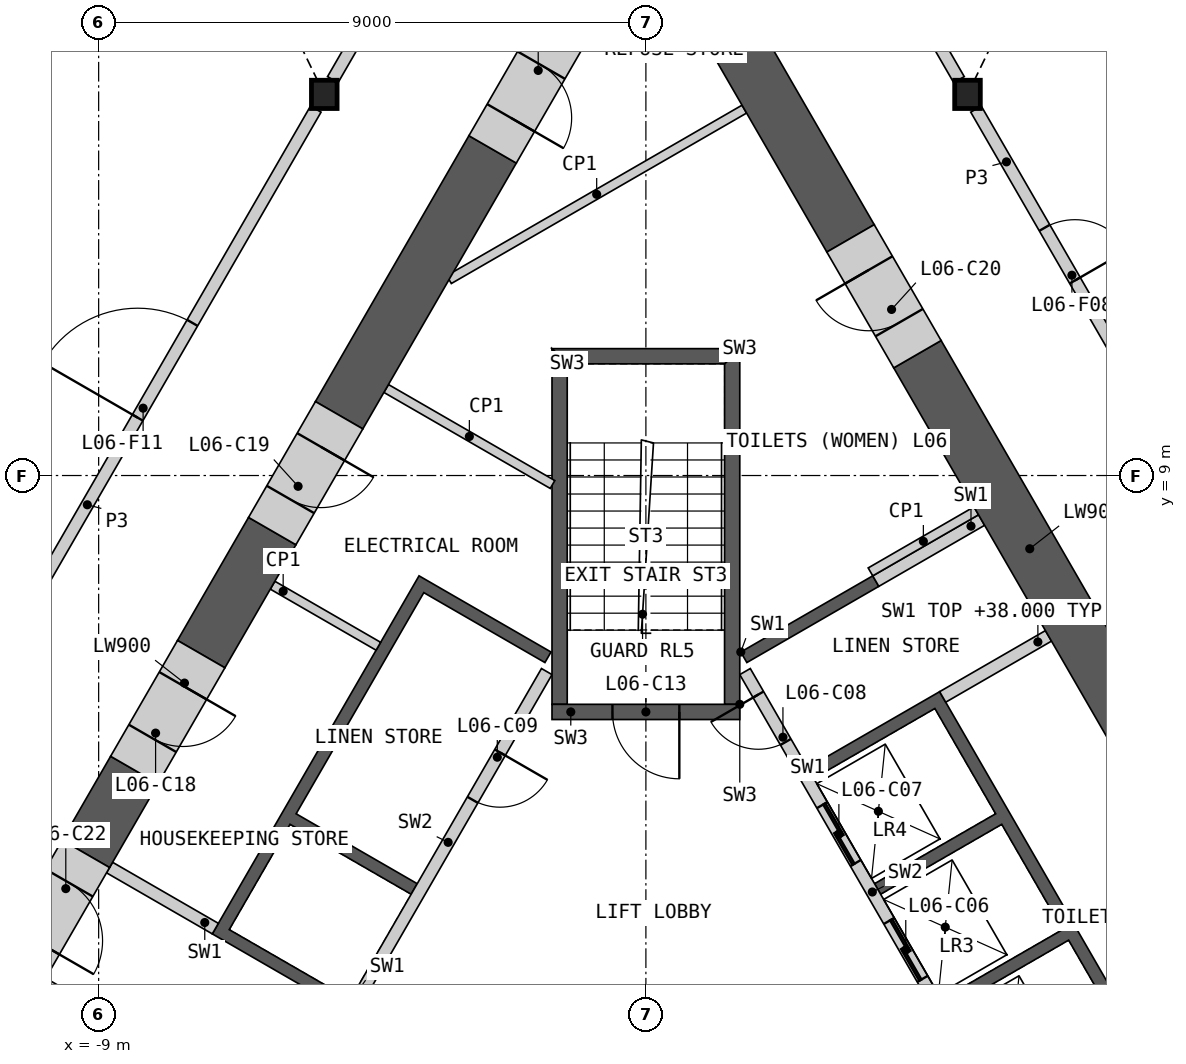
"""IFC4 building model, lengths in metres.
Left out: names, types, materials, properties, quantities, classifications, styles, units other than length and angle.
Written with IfcOpenShell. Run it as: python <this file> out.ifc"""

import sys

from ifc_helpers import new_model, si_unit, direction, frame, frame_2d, origin, origin_2d, place, context, subcontext, project, spatial, polyline, rectangle, i_section, outline, extrude, element, fill, save


model = new_model("IFC4")
c1 = context("Model", 3, precision=1e-05, world=origin(), true_north=direction((0.0, 1.0)))
c2 = subcontext(c1, "Body", "Model", "MODEL_VIEW")
j1 = project(units=[si_unit("LENGTHUNIT", "METRE"), si_unit("PLANEANGLEUNIT", "RADIAN")], contexts=[c1])
p1 = place(None, origin())
s1 = spatial("IfcSite", under=j1, at=p1, CompositionType="ELEMENT")
p2 = place(p1, origin())
s2 = spatial("IfcBuilding", under=s1, at=p2, CompositionType="ELEMENT")
p3 = place(p2, frame((0.0, 0.0, 34.2)))
s3 = spatial("IfcBuildingStorey", under=s2, at=p3, CompositionType="ELEMENT", Elevation=34.2)
for number, where, z_axis, x_axis in (
    (1, (-5.289, 15.269, 0.0), (0.0, 0.0, 1.0), (1.0, 0.0, 0.0)),
    (2, (5.289, 15.269, 0.0), (0.0, 0.0, 1.0), (1.0, 0.0, 0.0)),
):
    element("IfcColumn", number, at=place(p3, frame(where, z_axis=z_axis, x_axis=x_axis)), inside=s3, PredefinedType="COLUMN", context=c2, shape_type="SweptSolid", body=[
        extrude(i_section(OverallWidth=0.421, OverallDepth=0.465, WebThickness=0.045, FlangeThickness=0.072, at=origin_2d()), origin(), (0.0, 0.0, 1.0), 4.2),
    ])
p4 = place(p3, origin())
e3 = element("IfcWall", 3, at=p4, inside=s3, PredefinedType="SHEAR", context=c2, shape_type="SweptSolid", body=[
    extrude(outline(polyline([(1.561, 6.097), (3.731, 7.35), (3.831, 7.177), (1.66, 5.924), (1.561, 6.097)])), origin(), (0.0, 0.0, 1.0), 3.8),
])
p5 = place(p3, origin())
e4 = element("IfcWall", 4, at=p5, inside=s3, PredefinedType="SHEAR", context=c2, shape_type="SweptSolid", body=[
    extrude(outline(polyline([(2.66, 4.192), (4.831, 5.445), (8.231, -0.444), (6.061, -1.697), (5.96, -1.524), (7.952, -0.374), (6.952, 1.358), (4.96, 0.208), (4.861, 0.381), (6.852, 1.531), (5.852, 3.263), (3.861, 2.113), (3.76, 2.287), (5.752, 3.437), (4.752, 5.169), (2.76, 4.019), (2.66, 4.192)])), origin(), (0.0, 0.0, 1.0), 3.8),
])
p6 = place(p3, frame((5.817, -1.476, 0.0), z_axis=(0.0, 0.0, 1.0), x_axis=(-0.500002616675, 0.866023893041, 0.0)))
e5 = element("IfcWall", 5, at=p6, inside=s3, PredefinedType="SOLIDWALL", context=c2, shape_type="SweptSolid", body=[
    extrude(rectangle(XDim=8.373, YDim=0.2, at=frame_2d((4.187, 0.0))), origin(), (0.0, 0.0, 1.0), 3.8),
])
p7 = place(p6, frame((0.337, 0.0, 0.0)))
e6 = element("IfcOpeningElement", 6, at=p7, cuts=e5, PredefinedType="OPENING", context=c2, shape_type="SweptSolid", body=[
    extrude(rectangle(XDim=1.1, YDim=2.1, at=frame_2d((0.55, 1.05))), frame((0.0, 0.11, 0.0), z_axis=(0.0, -1.0, 0.0), x_axis=(1.0, 0.0, 0.0)), (0.0, 0.0, 1.0), 0.22),
])
p8 = place(p6, frame((2.537, 0.0, 0.0)))
e7 = element("IfcOpeningElement", 7, at=p8, cuts=e5, PredefinedType="OPENING", context=c2, shape_type="SweptSolid", body=[
    extrude(rectangle(XDim=1.1, YDim=2.1, at=frame_2d((0.55, 1.05))), frame((0.0, 0.11, 0.0), z_axis=(0.0, -1.0, 0.0), x_axis=(1.0, 0.0, 0.0)), (0.0, 0.0, 1.0), 0.22),
])
p9 = place(p6, frame((4.737, 0.0, 0.0)))
e8 = element("IfcOpeningElement", 8, at=p9, cuts=e5, PredefinedType="OPENING", context=c2, shape_type="SweptSolid", body=[
    extrude(rectangle(XDim=1.1, YDim=2.1, at=frame_2d((0.55, 1.05))), frame((0.0, 0.11, 0.0), z_axis=(0.0, -1.0, 0.0), x_axis=(1.0, 0.0, 0.0)), (0.0, 0.0, 1.0), 0.22),
])
p10 = place(p6, frame((7.037, 0.0, 0.0)))
e9 = element("IfcOpeningElement", 9, at=p10, cuts=e5, PredefinedType="OPENING", context=c2, shape_type="SweptSolid", body=[
    extrude(rectangle(XDim=0.9, YDim=2.1, at=frame_2d((0.45, 1.05))), frame((0.0, 0.11, 0.0), z_axis=(0.0, -1.0, 0.0), x_axis=(1.0, 0.0, 0.0)), (0.0, 0.0, 1.0), 0.22),
])
p11 = place(p3, frame((4.881, 5.358, 0.0), z_axis=(0.0, 0.0, 1.0), x_axis=(0.866035824272, 0.499981950752, 0.0)))
e10 = element("IfcWall", 10, at=p11, inside=s3, PredefinedType="SHEAR", context=c2, shape_type="SweptSolid", body=[
    extrude(rectangle(XDim=2.009, YDim=0.2, at=frame_2d((1.004, 0.0))), origin(), (0.0, 0.0, 1.0), 3.8),
])
p12 = place(p3, frame((3.781, 7.263, 0.0), z_axis=(0.0, 0.0, 1.0), x_axis=(0.865983199114, 0.50007309351, 0.0)))
e11 = element("IfcWall", 11, at=p12, inside=s3, PredefinedType="SHEAR", context=c2, shape_type="SweptSolid", body=[
    extrude(rectangle(XDim=2.009, YDim=0.2, at=frame_2d((1.004, 0.0))), origin(), (0.0, 0.0, 1.0), 3.8),
])
p13 = place(p3, origin())
e12 = element("IfcWall", 12, at=p13, inside=s3, PredefinedType="SHEAR", context=c2, shape_type="SweptSolid", body=[
    extrude(outline(polyline([(-4.96, 0.208), (-7.131, 1.461), (-3.731, 7.35), (-1.561, 6.097), (-1.66, 5.924), (-3.652, 7.074), (-5.752, 3.437), (-3.76, 2.287), (-3.861, 2.113), (-5.852, 3.263), (-6.852, 1.531), (-4.861, 0.381), (-4.96, 0.208)])), origin(), (0.0, 0.0, 1.0), 3.8),
])
p14 = place(p3, frame((-1.631, 5.776, 0.0), z_axis=(0.0, 0.0, 1.0), x_axis=(-0.499992876559, -0.866029516466, 0.0)))
e13 = element("IfcWall", 13, at=p14, inside=s3, PredefinedType="SOLIDWALL", context=c2, shape_type="SweptSolid", body=[
    extrude(rectangle(XDim=6.486, YDim=0.2, at=frame_2d((3.243, 0.0))), origin(), (0.0, 0.0, 1.0), 3.8),
])
p15 = place(p14, frame((1.537, 0.0, 0.0)))
e14 = element("IfcOpeningElement", 14, at=p15, cuts=e13, PredefinedType="OPENING", context=c2, shape_type="SweptSolid", body=[
    extrude(rectangle(XDim=0.9, YDim=2.1, at=frame_2d((0.45, 1.05))), frame((0.0, 0.11, 0.0), z_axis=(0.0, -1.0, 0.0), x_axis=(1.0, 0.0, 0.0)), (0.0, 0.0, 1.0), 0.22),
])
p16 = place(p3, frame((-7.081, 1.548, 0.0), z_axis=(0.0, 0.0, 1.0), x_axis=(-0.865983199114, 0.50007309351, 0.0)))
e15 = element("IfcWall", 15, at=p16, inside=s3, PredefinedType="SHEAR", context=c2, shape_type="SweptSolid", body=[
    extrude(rectangle(XDim=2.009, YDim=0.2, at=frame_2d((1.004, 0.0))), origin(), (0.0, 0.0, 1.0), 3.8),
])
p17 = place(p3, frame((-8.181, -0.357, 0.0), z_axis=(0.0, 0.0, 1.0), x_axis=(-0.866035824272, 0.499981950752, 0.0)))
e16 = element("IfcWall", 16, at=p17, inside=s3, PredefinedType="SHEAR", context=c2, shape_type="SweptSolid", body=[
    extrude(rectangle(XDim=2.009, YDim=0.2, at=frame_2d((1.004, 0.0))), origin(), (0.0, 0.0, 1.0), 3.8),
])
p18 = place(p3, origin())
e17 = element("IfcWall", 17, at=p18, inside=s3, PredefinedType="SHEAR", context=c2, shape_type="SweptSolid", body=[
    extrude(outline(polyline([(1.544, 5.237), (1.544, 11.087), (1.294, 10.837), (1.294, 5.237), (1.544, 5.237)])), origin(), (0.0, 0.0, 1.0), 3.8),
])
p19 = place(p3, origin())
e18 = element("IfcWall", 18, at=p19, inside=s3, PredefinedType="SHEAR", context=c2, shape_type="SweptSolid", body=[
    extrude(outline(polyline([(1.544, 11.087), (-1.544, 11.087), (-1.294, 10.837), (1.294, 10.837), (1.544, 11.087)])), origin(), (0.0, 0.0, 1.0), 3.8),
])
p20 = place(p3, origin())
e19 = element("IfcWall", 19, at=p20, inside=s3, PredefinedType="SHEAR", context=c2, shape_type="SweptSolid", body=[
    extrude(outline(polyline([(-1.294, 10.837), (-1.544, 11.087), (-1.544, 5.237), (-1.294, 5.237), (-1.294, 10.837)])), origin(), (0.0, 0.0, 1.0), 3.8),
])
p21 = place(p3, frame((1.544, 5.112, 0.0), z_axis=(0.0, 0.0, 1.0), x_axis=(-1.0, 0.0, 0.0)))
e20 = element("IfcWall", 20, at=p21, inside=s3, PredefinedType="SHEAR", context=c2, shape_type="SweptSolid", body=[
    extrude(rectangle(XDim=3.088, YDim=0.25, at=frame_2d((1.544, 0.0))), origin(), (0.0, 0.0, 1.0), 3.8),
])
p22 = place(p21, frame((0.994, 0.0, 0.0)))
e21 = element("IfcOpeningElement", 21, at=p22, cuts=e20, PredefinedType="OPENING", context=c2, shape_type="SweptSolid", body=[
    extrude(rectangle(XDim=1.1, YDim=2.1, at=frame_2d((0.55, 1.05))), frame((0.0, 0.135, 0.0), z_axis=(0.0, -1.0, 0.0), x_axis=(1.0, 0.0, 0.0)), (0.0, 0.0, 1.0), 0.27),
])
for number, where, z_axis, x_axis in (
    (22, (3.693, 7.415, 0.0), (0.0, 0.0, 1.0), (0.866, 0.5, 0.0)),
    (23, (-6.139, 7.196, 0.0), (0.0, 0.0, 1.0), (0.866, -0.5, 0.0)),
):
    element("IfcWall", number, at=place(p3, frame(where, z_axis=z_axis, x_axis=x_axis)), inside=s3, PredefinedType="PARTITIONING", context=c2, shape_type="SweptSolid", body=[
        extrude(rectangle(XDim=2.009, YDim=0.15, at=frame_2d((1.004, 0.0))), origin(), (0.0, 0.0, 1.0), 3.8),
    ])
p23 = place(p3, frame((-4.271, 10.432, 0.0), z_axis=(0.0, 0.0, 1.0), x_axis=(0.866018279777, -0.50001233894, 0.0)))
e24 = element("IfcWall", 24, at=p23, inside=s3, PredefinedType="PARTITIONING", context=c2, shape_type="SweptSolid", body=[
    extrude(rectangle(XDim=3.159, YDim=0.15, at=frame_2d((1.58, 0.0))), origin(), (0.0, 0.0, 1.0), 3.8),
])
p24 = place(p3, frame((1.619, 15.026, 0.0), z_axis=(0.0, 0.0, 1.0), x_axis=(-0.866015917575, -0.500016430238, 0.0)))
e25 = element("IfcWall", 25, at=p24, inside=s3, PredefinedType="PARTITIONING", context=c2, shape_type="SweptSolid", body=[
    extrude(rectangle(XDim=5.607, YDim=0.15, at=frame_2d((2.804, 0.0))), origin(), (0.0, 0.0, 1.0), 3.8),
])
p25 = place(p3, frame((8.16, 4.596, 0.0), z_axis=(0.0, 0.0, 1.0), x_axis=(-0.500012259336, 0.866018325738, 0.0)))
e26 = element("IfcWall", 26, at=p25, inside=s3, PredefinedType="SHEAR", context=c2, shape_type="SweptSolid", body=[
    extrude(rectangle(XDim=7.389, YDim=0.9, at=frame_2d((3.695, 0.0))), origin(), (0.0, 0.0, 1.0), 3.8),
])
p26 = place(p3, frame((3.365, 12.9, 0.0), z_axis=(0.0, 0.0, 1.0), x_axis=(-0.499981657175, 0.86603599376, 0.0)))
e27 = element("IfcWall", 27, at=p26, inside=s3, PredefinedType="SHEAR", context=c2, shape_type="SweptSolid", body=[
    extrude(rectangle(XDim=5.952, YDim=0.9, at=frame_2d((2.976, 0.0))), origin(), (0.0, 0.0, 1.0), 3.8),
])
p27 = place(p3, frame((-2.521, 14.364, 0.0), z_axis=(0.0, 0.0, 1.0), x_axis=(-0.500014099723, -0.866017263153, 0.0)))
e28 = element("IfcWall", 28, at=p27, inside=s3, PredefinedType="SHEAR", context=c2, shape_type="SweptSolid", body=[
    extrude(rectangle(XDim=5.048, YDim=0.9, at=frame_2d((2.524, 0.0))), origin(), (0.0, 0.0, 1.0), 3.8),
])
p28 = place(p3, frame((-6.145, 8.086, 0.0), z_axis=(0.0, 0.0, 1.0), x_axis=(-0.500026924946, -0.866009858102, 0.0)))
e29 = element("IfcWall", 29, at=p28, inside=s3, PredefinedType="SHEAR", context=c2, shape_type="SweptSolid", body=[
    extrude(rectangle(XDim=2.337, YDim=0.9, at=frame_2d((1.168, 0.0))), origin(), (0.0, 0.0, 1.0), 3.8),
])
p29 = place(p3, frame((-8.413, 4.157, 0.0), z_axis=(0.0, 0.0, 1.0), x_axis=(-0.499961121316, -0.86604784924, 0.0)))
e30 = element("IfcWall", 30, at=p29, inside=s3, PredefinedType="SHEAR", context=c2, shape_type="SweptSolid", body=[
    extrude(rectangle(XDim=1.594, YDim=0.9, at=frame_2d((0.797, 0.0))), origin(), (0.0, 0.0, 1.0), 3.8),
])
p30 = place(p3, frame((-7.313, 6.062, 0.0), z_axis=(0.0, 0.0, 1.0), x_axis=(-0.500077893725, -0.86598042715, 0.0)))
e31 = element("IfcWall", 31, at=p30, inside=s3, PredefinedType="SHEAR", context=c2, shape_type="SweptSolid", body=[
    extrude(rectangle(XDim=2.2, YDim=0.9, at=frame_2d((1.1, 0.0))), origin(), (0.0, 0.0, 1.0), 3.8),
])
p31 = place(p30, frame((0.6, 0.0, 0.0)))
e32 = element("IfcOpeningElement", 32, at=p31, cuts=e31, PredefinedType="OPENING", context=c2, shape_type="SweptSolid", body=[
    extrude(rectangle(XDim=1.0, YDim=2.1, at=frame_2d((0.5, 1.05))), frame((0.0, 0.46, 0.0), z_axis=(0.0, -1.0, 0.0), x_axis=(1.0, 0.0, 0.0)), (0.0, 0.0, 1.0), 0.92),
])
p32 = place(p3, frame((-5.045, 9.992, 0.0), z_axis=(0.0, 0.0, 1.0), x_axis=(-0.499898558967, -0.866083962871, 0.0)))
e33 = element("IfcWall", 33, at=p32, inside=s3, PredefinedType="SHEAR", context=c2, shape_type="SweptSolid", body=[
    extrude(rectangle(XDim=2.2, YDim=0.9, at=frame_2d((1.1, 0.0))), origin(), (0.0, 0.0, 1.0), 3.8),
])
p33 = place(p32, frame((0.6, 0.0, 0.0)))
e34 = element("IfcOpeningElement", 34, at=p33, cuts=e33, PredefinedType="OPENING", context=c2, shape_type="SweptSolid", body=[
    extrude(rectangle(XDim=1.0, YDim=2.1, at=frame_2d((0.5, 1.05))), frame((0.0, 0.46, 0.0), z_axis=(0.0, -1.0, 0.0), x_axis=(1.0, 0.0, 0.0)), (0.0, 0.0, 1.0), 0.92),
])
p34 = place(p3, frame((4.466, 10.995, 0.0), z_axis=(0.0, 0.0, 1.0), x_axis=(-0.500077893725, 0.86598042715, 0.0)))
e35 = element("IfcWall", 35, at=p34, inside=s3, PredefinedType="SHEAR", context=c2, shape_type="SweptSolid", body=[
    extrude(rectangle(XDim=2.2, YDim=0.9, at=frame_2d((1.1, 0.0))), origin(), (0.0, 0.0, 1.0), 3.8),
])
p35 = place(p34, frame((0.6, 0.0, 0.0)))
e36 = element("IfcOpeningElement", 36, at=p35, cuts=e35, PredefinedType="OPENING", context=c2, shape_type="SweptSolid", body=[
    extrude(rectangle(XDim=1.0, YDim=2.1, at=frame_2d((0.5, 1.05))), frame((0.0, 0.46, 0.0), z_axis=(0.0, -1.0, 0.0), x_axis=(1.0, 0.0, 0.0)), (0.0, 0.0, 1.0), 0.92),
])
p36 = place(p3, frame((-1.421, 16.269, 0.0), z_axis=(0.0, 0.0, 1.0), x_axis=(-0.50002983664, -0.866008176907, 0.0)))
e37 = element("IfcWall", 37, at=p36, inside=s3, PredefinedType="SHEAR", context=c2, shape_type="SweptSolid", body=[
    extrude(rectangle(XDim=2.2, YDim=0.9, at=frame_2d((1.1, 0.0))), origin(), (0.0, 0.0, 1.0), 3.8),
])
p37 = place(p36, frame((0.6, 0.0, 0.0)))
e38 = element("IfcOpeningElement", 38, at=p37, cuts=e37, PredefinedType="OPENING", context=c2, shape_type="SweptSolid", body=[
    extrude(rectangle(XDim=1.0, YDim=2.1, at=frame_2d((0.5, 1.05))), frame((0.0, 0.46, 0.0), z_axis=(0.0, -1.0, 0.0), x_axis=(1.0, 0.0, 0.0)), (0.0, 0.0, 1.0), 0.92),
])
p38 = place(p3, frame((-9.21, 2.777, 0.0), z_axis=(0.0, 0.0, 1.0), x_axis=(-0.500077893725, -0.86598042715, 0.0)))
e39 = element("IfcWall", 39, at=p38, inside=s3, PredefinedType="SHEAR", context=c2, shape_type="SweptSolid", body=[
    extrude(rectangle(XDim=2.2, YDim=0.9, at=frame_2d((1.1, 0.0))), origin(), (0.0, 0.0, 1.0), 3.8),
])
p39 = place(p38, frame((0.55, 0.0, 0.0)))
e40 = element("IfcOpeningElement", 40, at=p39, cuts=e39, PredefinedType="OPENING", context=c2, shape_type="SweptSolid", body=[
    extrude(rectangle(XDim=1.1, YDim=2.1, at=frame_2d((0.55, 1.05))), frame((0.0, 0.46, 0.0), z_axis=(0.0, -1.0, 0.0), x_axis=(1.0, 0.0, 0.0)), (0.0, 0.0, 1.0), 0.92),
])
p40 = place(p3, frame((5.429, 15.026, 0.0), z_axis=(0.0, 0.0, 1.0), x_axis=(0.50001002959, -0.86601961312, 0.0)))
e41 = element("IfcWall", 41, at=p40, inside=s3, PredefinedType="PARTITIONING", context=c2, shape_type="SweptSolid", body=[
    extrude(rectangle(XDim=10.019, YDim=0.2, at=frame_2d((5.009, 0.0))), origin(), (0.0, 0.0, 1.0), 3.8),
])
p41 = place(p40, frame((7.266, 0.0, 0.0)))
e42 = element("IfcOpeningElement", 42, at=p41, cuts=e41, PredefinedType="OPENING", context=c2, shape_type="SweptSolid", body=[
    extrude(rectangle(XDim=1.0, YDim=2.1, at=frame_2d((0.5, 1.05))), frame((0.0, 0.11, 0.0), z_axis=(0.0, -1.0, 0.0), x_axis=(1.0, 0.0, 0.0)), (0.0, 0.0, 1.0), 0.22),
])
p42 = place(p40, frame((2.254, 0.0, 0.0)))
e43 = element("IfcOpeningElement", 43, at=p42, cuts=e41, PredefinedType="OPENING", context=c2, shape_type="SweptSolid", body=[
    extrude(rectangle(XDim=1.0, YDim=2.1, at=frame_2d((0.5, 1.05))), frame((0.0, 0.11, 0.0), z_axis=(0.0, -1.0, 0.0), x_axis=(1.0, 0.0, 0.0)), (0.0, 0.0, 1.0), 0.22),
])
p43 = place(p3, frame((-10.439, 6.35, 0.0), z_axis=(0.0, 0.0, 1.0), x_axis=(0.50001002959, 0.86601961312, 0.0)))
e44 = element("IfcWall", 44, at=p43, inside=s3, PredefinedType="PARTITIONING", context=c2, shape_type="SweptSolid", body=[
    extrude(rectangle(XDim=10.019, YDim=0.2, at=frame_2d((5.009, 0.0))), origin(), (0.0, 0.0, 1.0), 3.8),
])
p44 = place(p43, frame((4.16, 0.0, 0.0)))
e45 = element("IfcOpeningElement", 45, at=p44, cuts=e44, PredefinedType="OPENING", context=c2, shape_type="SweptSolid", body=[
    extrude(rectangle(XDim=1.8, YDim=2.1, at=frame_2d((0.9, 1.05))), frame((0.0, 0.11, 0.0), z_axis=(0.0, -1.0, 0.0), x_axis=(1.0, 0.0, 0.0)), (0.0, 0.0, 1.0), 0.22),
])
p45 = place(p3, frame((-5.149, 15.511, 0.0), z_axis=(0.0, 0.0, 1.0), x_axis=(0.500001069878, 0.866024786089, 0.0)))
e46 = element("IfcWall", 46, at=p45, inside=s3, PredefinedType="PARTITIONING", context=c2, shape_type="SweptSolid", body=[
    extrude(rectangle(XDim=6.473, YDim=0.2, at=frame_2d((3.236, 0.0))), origin(), (0.0, 0.0, 1.0), 3.8),
])
p46 = place(p3, frame((1.913, 21.116, 0.0), z_axis=(0.0, 0.0, 1.0), x_axis=(0.500001069878, -0.866024786089, 0.0)))
e47 = element("IfcWall", 47, at=p46, inside=s3, PredefinedType="PARTITIONING", context=c2, shape_type="SweptSolid", body=[
    extrude(rectangle(XDim=6.473, YDim=0.2, at=frame_2d((3.236, 0.0))), origin(), (0.0, 0.0, 1.0), 3.8),
])
p47 = place(p46, frame((0.96, 0.0, 0.0)))
e48 = element("IfcOpeningElement", 48, at=p47, cuts=e47, PredefinedType="OPENING", context=c2, shape_type="SweptSolid", body=[
    extrude(rectangle(XDim=1.0, YDim=2.1, at=frame_2d((0.5, 1.05))), frame((0.0, 0.11, 0.0), z_axis=(0.0, -1.0, 0.0), x_axis=(1.0, 0.0, 0.0)), (0.0, 0.0, 1.0), 0.22),
])
p48 = place(p8, origin())
e49 = element("IfcDoor", 49, at=p48, inside=s3, OperationType="SLIDING_TO_LEFT", PredefinedType="DOOR", context=c2, shape_type="SweptSolid", body=[
    extrude(rectangle(XDim=1.1, YDim=2.1, at=frame_2d((0.55, 1.05))), frame((0.0, 0.025, 0.0), z_axis=(0.0, -1.0, 0.0), x_axis=(1.0, 0.0, 0.0)), (0.0, 0.0, 1.0), 0.05),
])
fill(e7, e49)
p49 = place(p9, origin())
e50 = element("IfcDoor", 50, at=p49, inside=s3, OperationType="SLIDING_TO_LEFT", PredefinedType="DOOR", context=c2, shape_type="SweptSolid", body=[
    extrude(rectangle(XDim=1.1, YDim=2.1, at=frame_2d((0.55, 1.05))), frame((0.0, 0.025, 0.0), z_axis=(0.0, -1.0, 0.0), x_axis=(1.0, 0.0, 0.0)), (0.0, 0.0, 1.0), 0.05),
])
fill(e8, e50)
p50 = place(p10, origin())
e51 = element("IfcDoor", 51, at=p50, inside=s3, OperationType="SINGLE_SWING_RIGHT", PredefinedType="DOOR", context=c2, shape_type="SweptSolid", body=[
    extrude(rectangle(XDim=0.9, YDim=2.1, at=frame_2d((0.45, 1.05))), frame((0.0, 0.025, 0.0), z_axis=(0.0, -1.0, 0.0), x_axis=(1.0, 0.0, 0.0)), (0.0, 0.0, 1.0), 0.05),
])
fill(e9, e51)
p51 = place(p15, origin())
e52 = element("IfcDoor", 52, at=p51, inside=s3, OperationType="SINGLE_SWING_LEFT", PredefinedType="DOOR", context=c2, shape_type="SweptSolid", body=[
    extrude(rectangle(XDim=0.9, YDim=2.1, at=frame_2d((0.45, 1.05))), frame((0.0, 0.025, 0.0), z_axis=(0.0, -1.0, 0.0), x_axis=(1.0, 0.0, 0.0)), (0.0, 0.0, 1.0), 0.05),
])
fill(e14, e52)
p52 = place(p22, origin())
e53 = element("IfcDoor", 53, at=p52, inside=s3, OperationType="SINGLE_SWING_LEFT", PredefinedType="DOOR", context=c2, shape_type="SweptSolid", body=[
    extrude(rectangle(XDim=1.1, YDim=2.1, at=frame_2d((0.55, 1.05))), frame((0.0, 0.025, 0.0), z_axis=(0.0, -1.0, 0.0), x_axis=(1.0, 0.0, 0.0)), (0.0, 0.0, 1.0), 0.05),
])
fill(e21, e53)
p53 = place(p31, origin())
e54 = element("IfcDoor", 54, at=p53, inside=s3, OperationType="SINGLE_SWING_LEFT", PredefinedType="DOOR", context=c2, shape_type="SweptSolid", body=[
    extrude(rectangle(XDim=1.0, YDim=2.1, at=frame_2d((0.5, 1.05))), frame((0.0, 0.205, 0.0), z_axis=(0.0, -1.0, 0.0), x_axis=(1.0, 0.0, 0.0)), (0.0, 0.0, 1.0), 0.05),
])
fill(e32, e54)
p54 = place(p33, origin())
e55 = element("IfcDoor", 55, at=p54, inside=s3, OperationType="SINGLE_SWING_LEFT", PredefinedType="DOOR", context=c2, shape_type="SweptSolid", body=[
    extrude(rectangle(XDim=1.0, YDim=2.1, at=frame_2d((0.5, 1.05))), frame((0.0, 0.205, 0.0), z_axis=(0.0, -1.0, 0.0), x_axis=(1.0, 0.0, 0.0)), (0.0, 0.0, 1.0), 0.05),
])
fill(e34, e55)
p55 = place(p35, origin())
e56 = element("IfcDoor", 56, at=p55, inside=s3, OperationType="SINGLE_SWING_RIGHT", PredefinedType="DOOR", context=c2, shape_type="SweptSolid", body=[
    extrude(rectangle(XDim=1.0, YDim=2.1, at=frame_2d((0.5, 1.05))), frame((0.0, 0.205, 0.0), z_axis=(0.0, -1.0, 0.0), x_axis=(1.0, 0.0, 0.0)), (0.0, 0.0, 1.0), 0.05),
])
fill(e36, e56)
p56 = place(p37, origin())
e57 = element("IfcDoor", 57, at=p56, inside=s3, OperationType="SINGLE_SWING_RIGHT", PredefinedType="DOOR", context=c2, shape_type="SweptSolid", body=[
    extrude(rectangle(XDim=1.0, YDim=2.1, at=frame_2d((0.5, 1.05))), frame((0.0, 0.205, 0.0), z_axis=(0.0, -1.0, 0.0), x_axis=(1.0, 0.0, 0.0)), (0.0, 0.0, 1.0), 0.05),
])
fill(e38, e57)
p57 = place(p39, origin())
e58 = element("IfcDoor", 58, at=p57, inside=s3, OperationType="SINGLE_SWING_RIGHT", PredefinedType="DOOR", context=c2, shape_type="SweptSolid", body=[
    extrude(rectangle(XDim=1.1, YDim=2.1, at=frame_2d((0.55, 1.05))), frame((0.0, 0.205, 0.0), z_axis=(0.0, -1.0, 0.0), x_axis=(1.0, 0.0, 0.0)), (0.0, 0.0, 1.0), 0.05),
])
fill(e40, e58)
p58 = place(p42, origin())
e59 = element("IfcDoor", 59, at=p58, inside=s3, OperationType="SINGLE_SWING_RIGHT", PredefinedType="DOOR", context=c2, shape_type="SweptSolid", body=[
    extrude(rectangle(XDim=1.0, YDim=2.1, at=frame_2d((0.5, 1.05))), frame((0.0, 0.025, 0.0), z_axis=(0.0, -1.0, 0.0), x_axis=(1.0, 0.0, 0.0)), (0.0, 0.0, 1.0), 0.05),
])
fill(e43, e59)
p59 = place(p44, origin())
e60 = element("IfcDoor", 60, at=p59, inside=s3, OperationType="DOUBLE_DOOR_SINGLE_SWING", PredefinedType="DOOR", context=c2, shape_type="SweptSolid", body=[
    extrude(rectangle(XDim=1.8, YDim=2.1, at=frame_2d((0.9, 1.05))), frame((0.0, 0.025, 0.0), z_axis=(0.0, -1.0, 0.0), x_axis=(1.0, 0.0, 0.0)), (0.0, 0.0, 1.0), 0.05),
])
fill(e45, e60)
save(model, sys.argv[1])
